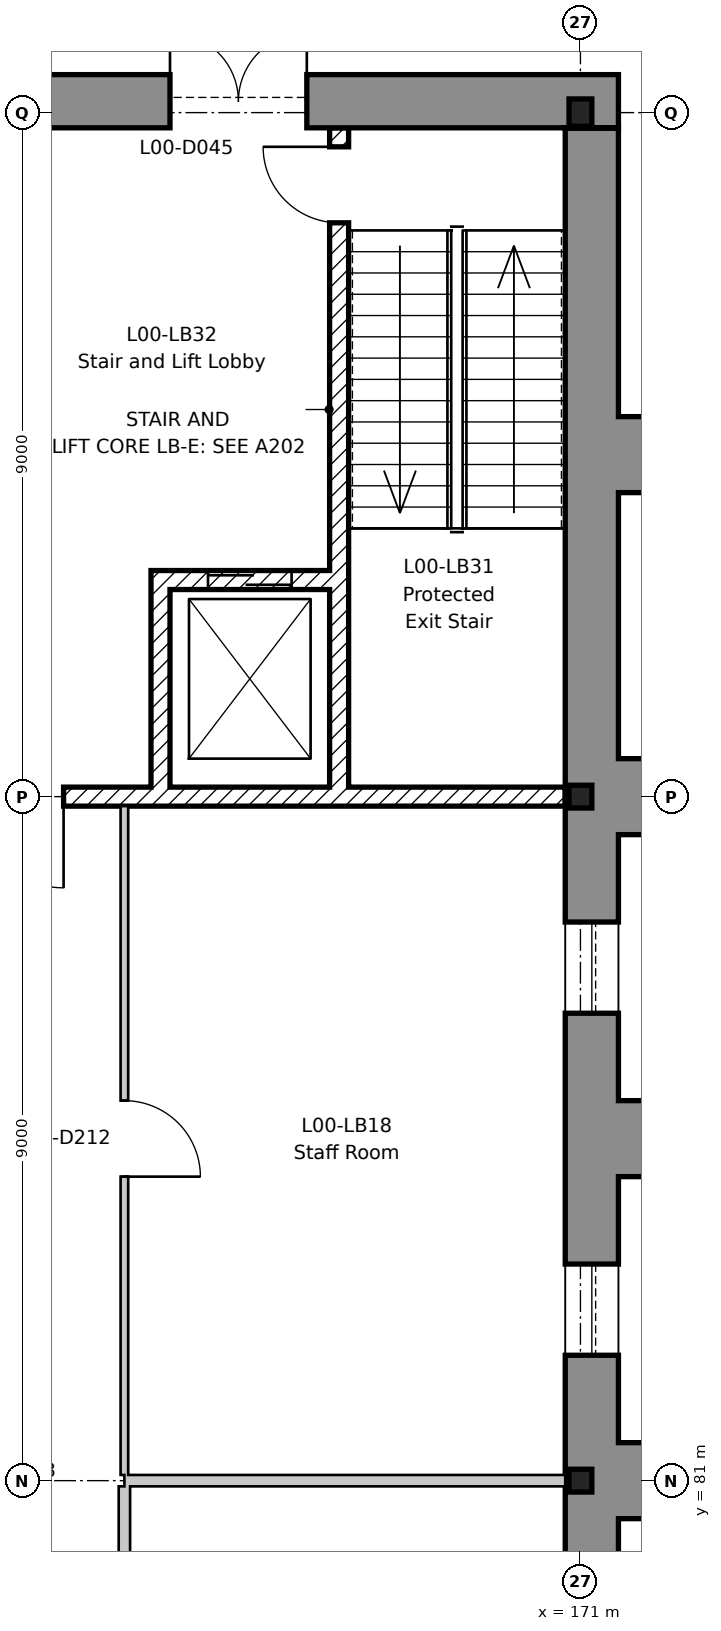
"""IFC4 building model, lengths in metres.
Left out: names, types, materials, properties, quantities, classifications, styles, units other than length and angle.
Written with IfcOpenShell. Run it as: python <this file> out.ifc"""

import sys

from ifc_helpers import new_model, si_unit, direction, frame, frame_2d, origin, origin_2d, place, context, subcontext, project, spatial, rectangle, i_section, extrude, element, fill, save


model = new_model("IFC4")
c1 = context("Model", 3, precision=1e-05, world=origin(), true_north=direction((0.0, 1.0)))
c2 = subcontext(c1, "Body", "Model", "MODEL_VIEW")
j1 = project(units=[si_unit("LENGTHUNIT", "METRE"), si_unit("PLANEANGLEUNIT", "RADIAN")], contexts=[c1])
p1 = place(None, origin())
s1 = spatial("IfcSite", under=j1, at=p1, CompositionType="ELEMENT")
p2 = place(p1, origin())
s2 = spatial("IfcBuilding", under=s1, at=p2, CompositionType="ELEMENT")
p3 = place(p2, origin())
s3 = spatial("IfcBuildingStorey", under=s2, at=p3, CompositionType="ELEMENT", Elevation=0.0)
for number, where, z_axis, x_axis in (
    (1, (171.0, 81.0, -0.6), (0.0, 0.0, 1.0), (1.0, 0.0, 0.0)),
    (2, (171.0, 90.0, -0.6), (0.0, 0.0, 1.0), (1.0, 0.0, 0.0)),
):
    element("IfcColumn", number, at=place(p3, frame(where, z_axis=z_axis, x_axis=x_axis)), inside=s3, PredefinedType="COLUMN", context=c2, shape_type="SweptSolid", body=[
        extrude(i_section(OverallWidth=0.3, OverallDepth=0.3, WebThickness=0.011, FlangeThickness=0.019, FilletRadius=0.027, at=origin_2d()), origin(), (0.0, 0.0, 1.0), 5.8),
    ])
p4 = place(p3, frame((171.0, 99.0, -0.6), z_axis=(0.0, 0.0, 1.0), x_axis=(1.0, 0.0, 0.0)))
e3 = element("IfcColumn", 3, at=p4, inside=s3, PredefinedType="COLUMN", context=c2, shape_type="SweptSolid", body=[
    extrude(i_section(OverallWidth=0.3, OverallDepth=0.36, WebThickness=0.012, FlangeThickness=0.022, FilletRadius=0.027, at=origin_2d()), origin(), (0.0, 0.0, 1.0), 5.8),
])
p5 = place(p3, frame((167.825, 98.8, 0.0), z_axis=(0.0, 0.0, 1.0), x_axis=(0.0, -1.0, 0.0)))
e4 = element("IfcWall", 4, at=p5, inside=s3, PredefinedType="SHEAR", context=c2, shape_type="SweptSolid", body=[
    extrude(rectangle(XDim=8.675, YDim=0.25, at=frame_2d((4.337, 0.0))), origin(), (0.0, 0.0, 1.0), 5.2),
])
p6 = place(p5, frame((0.25, 0.0, 0.0)))
e5 = element("IfcOpeningElement", 5, at=p6, cuts=e4, PredefinedType="OPENING", context=c2, shape_type="SweptSolid", body=[
    extrude(rectangle(XDim=1.0, YDim=2.1, at=frame_2d((0.5, 1.05))), frame((0.0, 0.135, 0.0), z_axis=(0.0, -1.0, 0.0), x_axis=(1.0, 0.0, 0.0)), (0.0, 0.0, 1.0), 0.27),
])
p7 = place(p3, frame((170.8, 90.0, 0.0), z_axis=(0.0, 0.0, 1.0), x_axis=(-1.0, 0.0, 0.0)))
e6 = element("IfcWall", 6, at=p7, inside=s3, PredefinedType="SHEAR", context=c2, shape_type="SweptSolid", body=[
    extrude(rectangle(XDim=8.65, YDim=0.25, at=frame_2d((4.325, 0.0))), origin(), (0.0, 0.0, 1.0), 5.2),
])
p8 = place(p7, frame((6.6, 0.0, 0.0)))
e7 = element("IfcOpeningElement", 7, at=p8, cuts=e6, PredefinedType="OPENING", context=c2, shape_type="SweptSolid", body=[
    extrude(rectangle(XDim=1.2, YDim=2.1, at=frame_2d((0.6, 1.05))), frame((0.0, 0.135, 0.0), z_axis=(0.0, -1.0, 0.0), x_axis=(1.0, 0.0, 0.0)), (0.0, 0.0, 1.0), 0.27),
])
p9 = place(p3, frame((167.7, 92.85, 0.0), z_axis=(0.0, 0.0, 1.0), x_axis=(-1.0, 0.0, 0.0)))
e8 = element("IfcWall", 8, at=p9, inside=s3, PredefinedType="SHEAR", context=c2, shape_type="SweptSolid", body=[
    extrude(rectangle(XDim=2.35, YDim=0.25, at=frame_2d((1.175, 0.0))), origin(), (0.0, 0.0, 1.0), 5.2),
])
p10 = place(p9, frame((0.5, 0.0, 0.0)))
e9 = element("IfcOpeningElement", 9, at=p10, cuts=e8, PredefinedType="OPENING", context=c2, shape_type="SweptSolid", body=[
    extrude(rectangle(XDim=1.1, YDim=2.1, at=frame_2d((0.55, 1.05))), frame((0.0, 0.135, 0.0), z_axis=(0.0, -1.0, 0.0), x_axis=(1.0, 0.0, 0.0)), (0.0, 0.0, 1.0), 0.27),
])
p11 = place(p3, frame((165.475, 92.725, 0.0), z_axis=(0.0, 0.0, 1.0), x_axis=(0.0, -1.0, 0.0)))
e10 = element("IfcWall", 10, at=p11, inside=s3, PredefinedType="SHEAR", context=c2, shape_type="SweptSolid", body=[
    extrude(rectangle(XDim=2.6, YDim=0.25, at=frame_2d((1.3, 0.0))), origin(), (0.0, 0.0, 1.0), 5.2),
])
p12 = place(p3, frame((167.7, 92.85, -1.2), z_axis=(0.0, 0.0, 1.0), x_axis=(-1.0, 0.0, 0.0)))
e11 = element("IfcWall", 11, at=p12, inside=s3, PredefinedType="SHEAR", context=c2, shape_type="SweptSolid", body=[
    extrude(rectangle(XDim=2.35, YDim=0.25, at=frame_2d((1.175, 0.0))), origin(), (0.0, 0.0, 1.0), 1.2),
])
for number, where, z_axis, x_axis in (
    (12, (165.475, 92.975, -1.2), (0.0, 0.0, 1.0), (0.0, -1.0, 0.0)),
    (13, (167.825, 92.975, -1.2), (0.0, 0.0, 1.0), (0.0, -1.0, 0.0)),
):
    element("IfcWall", number, at=place(p3, frame(where, z_axis=z_axis, x_axis=x_axis)), inside=s3, PredefinedType="SHEAR", context=c2, shape_type="SweptSolid", body=[
        extrude(rectangle(XDim=2.85, YDim=0.25, at=frame_2d((1.425, 0.0))), origin(), (0.0, 0.0, 1.0), 1.2),
    ])
p13 = place(p3, frame((167.95, 90.0, -1.2), z_axis=(0.0, 0.0, 1.0), x_axis=(-1.0, 0.0, 0.0)))
e14 = element("IfcWall", 14, at=p13, inside=s3, PredefinedType="SHEAR", context=c2, shape_type="SweptSolid", body=[
    extrude(rectangle(XDim=2.6, YDim=0.25, at=frame_2d((1.3, 0.0))), origin(), (0.0, 0.0, 1.0), 1.2),
])
p14 = place(p3, frame((116.5, 99.15, 0.0), z_axis=(0.0, 0.0, 1.0), x_axis=(1.0, 0.0, 0.0)))
e15 = element("IfcWall", 15, at=p14, inside=s3, PredefinedType="STANDARD", context=c2, shape_type="SweptSolid", body=[
    extrude(rectangle(XDim=55.0, YDim=0.7, at=frame_2d((27.5, 0.0))), origin(), (0.0, 0.0, 1.0), 5.2),
])
p15 = place(p14, frame((2.15, 0.0, 1.2)))
e16 = element("IfcOpeningElement", 16, at=p15, cuts=e15, PredefinedType="OPENING", context=c2, shape_type="SweptSolid", body=[
    extrude(rectangle(XDim=1.2, YDim=1.8, at=frame_2d((0.6, 0.9))), frame((0.0, 0.36, 0.0), z_axis=(0.0, -1.0, 0.0), x_axis=(1.0, 0.0, 0.0)), (0.0, 0.0, 1.0), 0.72),
])
p16 = place(p14, frame((6.65, 0.0, 1.2)))
e17 = element("IfcOpeningElement", 17, at=p16, cuts=e15, PredefinedType="OPENING", context=c2, shape_type="SweptSolid", body=[
    extrude(rectangle(XDim=1.2, YDim=1.8, at=frame_2d((0.6, 0.9))), frame((0.0, 0.36, 0.0), z_axis=(0.0, -1.0, 0.0), x_axis=(1.0, 0.0, 0.0)), (0.0, 0.0, 1.0), 0.72),
])
p17 = place(p14, frame((11.15, 0.0, 1.2)))
e18 = element("IfcOpeningElement", 18, at=p17, cuts=e15, PredefinedType="OPENING", context=c2, shape_type="SweptSolid", body=[
    extrude(rectangle(XDim=1.2, YDim=1.8, at=frame_2d((0.6, 0.9))), frame((0.0, 0.36, 0.0), z_axis=(0.0, -1.0, 0.0), x_axis=(1.0, 0.0, 0.0)), (0.0, 0.0, 1.0), 0.72),
])
p18 = place(p14, frame((15.65, 0.0, 1.2)))
e19 = element("IfcOpeningElement", 19, at=p18, cuts=e15, PredefinedType="OPENING", context=c2, shape_type="SweptSolid", body=[
    extrude(rectangle(XDim=1.2, YDim=1.8, at=frame_2d((0.6, 0.9))), frame((0.0, 0.36, 0.0), z_axis=(0.0, -1.0, 0.0), x_axis=(1.0, 0.0, 0.0)), (0.0, 0.0, 1.0), 0.72),
])
p19 = place(p14, frame((20.15, 0.0, 1.2)))
e20 = element("IfcOpeningElement", 20, at=p19, cuts=e15, PredefinedType="OPENING", context=c2, shape_type="SweptSolid", body=[
    extrude(rectangle(XDim=1.2, YDim=1.8, at=frame_2d((0.6, 0.9))), frame((0.0, 0.36, 0.0), z_axis=(0.0, -1.0, 0.0), x_axis=(1.0, 0.0, 0.0)), (0.0, 0.0, 1.0), 0.72),
])
p20 = place(p14, frame((24.65, 0.0, 1.2)))
e21 = element("IfcOpeningElement", 21, at=p20, cuts=e15, PredefinedType="OPENING", context=c2, shape_type="SweptSolid", body=[
    extrude(rectangle(XDim=1.2, YDim=1.8, at=frame_2d((0.6, 0.9))), frame((0.0, 0.36, 0.0), z_axis=(0.0, -1.0, 0.0), x_axis=(1.0, 0.0, 0.0)), (0.0, 0.0, 1.0), 0.72),
])
p21 = place(p14, frame((29.15, 0.0, 1.2)))
e22 = element("IfcOpeningElement", 22, at=p21, cuts=e15, PredefinedType="OPENING", context=c2, shape_type="SweptSolid", body=[
    extrude(rectangle(XDim=1.2, YDim=1.8, at=frame_2d((0.6, 0.9))), frame((0.0, 0.36, 0.0), z_axis=(0.0, -1.0, 0.0), x_axis=(1.0, 0.0, 0.0)), (0.0, 0.0, 1.0), 0.72),
])
p22 = place(p14, frame((33.65, 0.0, 1.2)))
e23 = element("IfcOpeningElement", 23, at=p22, cuts=e15, PredefinedType="OPENING", context=c2, shape_type="SweptSolid", body=[
    extrude(rectangle(XDim=1.2, YDim=1.8, at=frame_2d((0.6, 0.9))), frame((0.0, 0.36, 0.0), z_axis=(0.0, -1.0, 0.0), x_axis=(1.0, 0.0, 0.0)), (0.0, 0.0, 1.0), 0.72),
])
p23 = place(p14, frame((38.15, 0.0, 1.2)))
e24 = element("IfcOpeningElement", 24, at=p23, cuts=e15, PredefinedType="OPENING", context=c2, shape_type="SweptSolid", body=[
    extrude(rectangle(XDim=1.2, YDim=1.8, at=frame_2d((0.6, 0.9))), frame((0.0, 0.36, 0.0), z_axis=(0.0, -1.0, 0.0), x_axis=(1.0, 0.0, 0.0)), (0.0, 0.0, 1.0), 0.72),
])
p24 = place(p14, frame((42.65, 0.0, 1.2)))
e25 = element("IfcOpeningElement", 25, at=p24, cuts=e15, PredefinedType="OPENING", context=c2, shape_type="SweptSolid", body=[
    extrude(rectangle(XDim=1.2, YDim=1.8, at=frame_2d((0.6, 0.9))), frame((0.0, 0.36, 0.0), z_axis=(0.0, -1.0, 0.0), x_axis=(1.0, 0.0, 0.0)), (0.0, 0.0, 1.0), 0.72),
])
p25 = place(p14, frame((49.1, 0.0, 0.0)))
e26 = element("IfcOpeningElement", 26, at=p25, cuts=e15, PredefinedType="OPENING", context=c2, shape_type="SweptSolid", body=[
    extrude(rectangle(XDim=1.8, YDim=2.1, at=frame_2d((0.9, 1.05))), frame((0.0, 0.36, 0.0), z_axis=(0.0, -1.0, 0.0), x_axis=(1.0, 0.0, 0.0)), (0.0, 0.0, 1.0), 0.72),
])
p26 = place(p3, frame((171.15, 63.2, 0.0), z_axis=(0.0, 0.0, 1.0), x_axis=(0.0, 1.0, 0.0)))
e27 = element("IfcWall", 27, at=p26, inside=s3, PredefinedType="STANDARD", context=c2, shape_type="SweptSolid", body=[
    extrude(rectangle(XDim=35.6, YDim=0.7, at=frame_2d((17.8, 0.0))), origin(), (0.0, 0.0, 1.0), 5.2),
])
p27 = place(p26, frame((1.45, 0.0, 1.2)))
e28 = element("IfcOpeningElement", 28, at=p27, cuts=e27, PredefinedType="OPENING", context=c2, shape_type="SweptSolid", body=[
    extrude(rectangle(XDim=1.2, YDim=1.8, at=frame_2d((0.6, 0.9))), frame((0.0, 0.36, 0.0), z_axis=(0.0, -1.0, 0.0), x_axis=(1.0, 0.0, 0.0)), (0.0, 0.0, 1.0), 0.72),
])
p28 = place(p26, frame((5.95, 0.0, 1.2)))
e29 = element("IfcOpeningElement", 29, at=p28, cuts=e27, PredefinedType="OPENING", context=c2, shape_type="SweptSolid", body=[
    extrude(rectangle(XDim=1.2, YDim=1.8, at=frame_2d((0.6, 0.9))), frame((0.0, 0.36, 0.0), z_axis=(0.0, -1.0, 0.0), x_axis=(1.0, 0.0, 0.0)), (0.0, 0.0, 1.0), 0.72),
])
p29 = place(p26, frame((10.45, 0.0, 1.2)))
e30 = element("IfcOpeningElement", 30, at=p29, cuts=e27, PredefinedType="OPENING", context=c2, shape_type="SweptSolid", body=[
    extrude(rectangle(XDim=1.2, YDim=1.8, at=frame_2d((0.6, 0.9))), frame((0.0, 0.36, 0.0), z_axis=(0.0, -1.0, 0.0), x_axis=(1.0, 0.0, 0.0)), (0.0, 0.0, 1.0), 0.72),
])
p30 = place(p26, frame((14.95, 0.0, 1.2)))
e31 = element("IfcOpeningElement", 31, at=p30, cuts=e27, PredefinedType="OPENING", context=c2, shape_type="SweptSolid", body=[
    extrude(rectangle(XDim=1.2, YDim=1.8, at=frame_2d((0.6, 0.9))), frame((0.0, 0.36, 0.0), z_axis=(0.0, -1.0, 0.0), x_axis=(1.0, 0.0, 0.0)), (0.0, 0.0, 1.0), 0.72),
])
p31 = place(p26, frame((19.45, 0.0, 1.2)))
e32 = element("IfcOpeningElement", 32, at=p31, cuts=e27, PredefinedType="OPENING", context=c2, shape_type="SweptSolid", body=[
    extrude(rectangle(XDim=1.2, YDim=1.8, at=frame_2d((0.6, 0.9))), frame((0.0, 0.36, 0.0), z_axis=(0.0, -1.0, 0.0), x_axis=(1.0, 0.0, 0.0)), (0.0, 0.0, 1.0), 0.72),
])
p32 = place(p26, frame((23.95, 0.0, 1.2)))
e33 = element("IfcOpeningElement", 33, at=p32, cuts=e27, PredefinedType="OPENING", context=c2, shape_type="SweptSolid", body=[
    extrude(rectangle(XDim=1.2, YDim=1.8, at=frame_2d((0.6, 0.9))), frame((0.0, 0.36, 0.0), z_axis=(0.0, -1.0, 0.0), x_axis=(1.0, 0.0, 0.0)), (0.0, 0.0, 1.0), 0.72),
])
p33 = place(p26, frame((7.45, 0.0, 0.0)))
e34 = element("IfcOpeningElement", 34, at=p33, cuts=e27, PredefinedType="OPENING", context=c2, shape_type="SweptSolid", body=[
    extrude(rectangle(XDim=1.2, YDim=2.1, at=frame_2d((0.6, 1.05))), frame((0.0, 0.36, 0.0), z_axis=(0.0, -1.0, 0.0), x_axis=(1.0, 0.0, 0.0)), (0.0, 0.0, 1.0), 0.72),
])
for number, where, z_axis, x_axis in (
    (35, (172.1, 80.5, 0.0), (0.0, 0.0, 1.0), (0.0, 1.0, 0.0)),
    (36, (172.1, 85.0, 0.0), (0.0, 0.0, 1.0), (0.0, 1.0, 0.0)),
    (37, (172.1, 89.5, 0.0), (0.0, 0.0, 1.0), (0.0, 1.0, 0.0)),
    (38, (172.1, 94.0, 0.0), (0.0, 0.0, 1.0), (0.0, 1.0, 0.0)),
):
    element("IfcWall", number, at=place(p3, frame(where, z_axis=z_axis, x_axis=x_axis)), inside=s3, PredefinedType="STANDARD", context=c2, shape_type="SweptSolid", body=[
        extrude(rectangle(XDim=1.0, YDim=1.2, at=frame_2d((0.5, 0.0))), origin(), (0.0, 0.0, 1.0), 5.4),
    ])
p34 = place(p3, frame((165.0, 81.0, 0.0), z_axis=(0.0, 0.0, 1.0), x_axis=(1.0, 0.0, 0.0)))
e39 = element("IfcWall", 39, at=p34, inside=s3, PredefinedType="PARTITIONING", context=c2, shape_type="SweptSolid", body=[
    extrude(rectangle(XDim=5.8, YDim=0.15, at=frame_2d((2.9, 0.0))), origin(), (0.0, 0.0, 1.0), 4.68),
])
p35 = place(p3, frame((165.0, 69.075, 0.0), z_axis=(0.0, 0.0, 1.0), x_axis=(0.0, 1.0, 0.0)))
e40 = element("IfcWall", 40, at=p35, inside=s3, PredefinedType="PARTITIONING", context=c2, shape_type="SweptSolid", body=[
    extrude(rectangle(XDim=11.85, YDim=0.15, at=frame_2d((5.925, 0.0))), origin(), (0.0, 0.0, 1.0), 4.68),
])
p36 = place(p35, frame((0.825, 0.0, 0.0)))
e41 = element("IfcOpeningElement", 41, at=p36, cuts=e40, PredefinedType="OPENING", context=c2, shape_type="SweptSolid", body=[
    extrude(rectangle(XDim=1.2, YDim=2.1, at=frame_2d((0.6, 1.05))), frame((0.0, 0.085, 0.0), z_axis=(0.0, -1.0, 0.0), x_axis=(1.0, 0.0, 0.0)), (0.0, 0.0, 1.0), 0.17),
])
p37 = place(p35, frame((6.925, 0.0, 0.0)))
e42 = element("IfcOpeningElement", 42, at=p37, cuts=e40, PredefinedType="OPENING", context=c2, shape_type="SweptSolid", body=[
    extrude(rectangle(XDim=1.0, YDim=2.1, at=frame_2d((0.5, 1.05))), frame((0.0, 0.085, 0.0), z_axis=(0.0, -1.0, 0.0), x_axis=(1.0, 0.0, 0.0)), (0.0, 0.0, 1.0), 0.17),
])
p38 = place(p3, frame((165.0, 81.075, 0.0), z_axis=(0.0, 0.0, 1.0), x_axis=(0.0, 1.0, 0.0)))
e43 = element("IfcWall", 43, at=p38, inside=s3, PredefinedType="PARTITIONING", context=c2, shape_type="SweptSolid", body=[
    extrude(rectangle(XDim=8.8, YDim=0.1, at=frame_2d((4.4, 0.0))), origin(), (0.0, 0.0, 1.0), 4.68),
])
p39 = place(p38, frame((3.925, 0.0, 0.0)))
e44 = element("IfcOpeningElement", 44, at=p39, cuts=e43, PredefinedType="OPENING", context=c2, shape_type="SweptSolid", body=[
    extrude(rectangle(XDim=1.0, YDim=2.1, at=frame_2d((0.5, 1.05))), frame((0.0, 0.06, 0.0), z_axis=(0.0, -1.0, 0.0), x_axis=(1.0, 0.0, 0.0)), (0.0, 0.0, 1.0), 0.12),
])
p40 = place(p31, origin())
e45 = element("IfcWindow", 45, at=p40, inside=s3, PartitioningType="SINGLE_PANEL", PredefinedType="WINDOW", context=c2, shape_type="SweptSolid", body=[
    extrude(rectangle(XDim=1.2, YDim=1.8, at=frame_2d((0.6, 0.9))), frame((0.0, 0.03, 0.0), z_axis=(0.0, -1.0, 0.0), x_axis=(1.0, 0.0, 0.0)), (0.0, 0.0, 1.0), 0.06),
])
fill(e32, e45)
p41 = place(p32, origin())
e46 = element("IfcWindow", 46, at=p41, inside=s3, PartitioningType="SINGLE_PANEL", PredefinedType="WINDOW", context=c2, shape_type="SweptSolid", body=[
    extrude(rectangle(XDim=1.2, YDim=1.8, at=frame_2d((0.6, 0.9))), frame((0.0, 0.03, 0.0), z_axis=(0.0, -1.0, 0.0), x_axis=(1.0, 0.0, 0.0)), (0.0, 0.0, 1.0), 0.06),
])
fill(e33, e46)
p42 = place(p25, origin())
e47 = element("IfcDoor", 47, at=p42, inside=s3, OperationType="DOUBLE_DOOR_SINGLE_SWING", PredefinedType="DOOR", context=c2, shape_type="SweptSolid", body=[
    extrude(rectangle(XDim=1.8, YDim=2.1, at=frame_2d((0.9, 1.05))), frame((0.0, 0.025, 0.0), z_axis=(0.0, -1.0, 0.0), x_axis=(1.0, 0.0, 0.0)), (0.0, 0.0, 1.0), 0.05),
])
fill(e26, e47)
p43 = place(p39, frame((1.0, 0.0, 0.0), z_axis=(0.0, 0.0, 1.0), x_axis=(-1.0, 0.0, 0.0)))
e48 = element("IfcDoor", 48, at=p43, inside=s3, OperationType="SINGLE_SWING_RIGHT", PredefinedType="DOOR", context=c2, shape_type="SweptSolid", body=[
    extrude(rectangle(XDim=1.0, YDim=2.1, at=frame_2d((0.5, 1.05))), frame((0.0, 0.025, 0.0), z_axis=(0.0, -1.0, 0.0), x_axis=(1.0, 0.0, 0.0)), (0.0, 0.0, 1.0), 0.05),
])
fill(e44, e48)
p44 = place(p6, frame((1.0, 0.0, 0.0), z_axis=(0.0, 0.0, 1.0), x_axis=(-1.0, 0.0, 0.0)))
e49 = element("IfcDoor", 49, at=p44, inside=s3, OperationType="SINGLE_SWING_RIGHT", PredefinedType="DOOR", context=c2, shape_type="SweptSolid", body=[
    extrude(rectangle(XDim=1.0, YDim=2.1, at=frame_2d((0.5, 1.05))), frame((0.0, 0.025, 0.0), z_axis=(0.0, -1.0, 0.0), x_axis=(1.0, 0.0, 0.0)), (0.0, 0.0, 1.0), 0.05),
])
fill(e5, e49)
p45 = place(p10, origin())
e50 = element("IfcDoor", 50, at=p45, inside=s3, OperationType="SLIDING_TO_LEFT", PredefinedType="DOOR", context=c2, shape_type="SweptSolid", body=[
    extrude(rectangle(XDim=1.1, YDim=2.1, at=frame_2d((0.55, 1.05))), frame((0.0, 0.025, 0.0), z_axis=(0.0, -1.0, 0.0), x_axis=(1.0, 0.0, 0.0)), (0.0, 0.0, 1.0), 0.05),
])
fill(e9, e50)
p46 = place(p8, origin())
e51 = element("IfcDoor", 51, at=p46, inside=s3, OperationType="SINGLE_SWING_LEFT", PredefinedType="DOOR", context=c2, shape_type="SweptSolid", body=[
    extrude(rectangle(XDim=1.2, YDim=2.1, at=frame_2d((0.6, 1.05))), frame((0.0, 0.025, 0.0), z_axis=(0.0, -1.0, 0.0), x_axis=(1.0, 0.0, 0.0)), (0.0, 0.0, 1.0), 0.05),
])
fill(e7, e51)
save(model, sys.argv[1])
